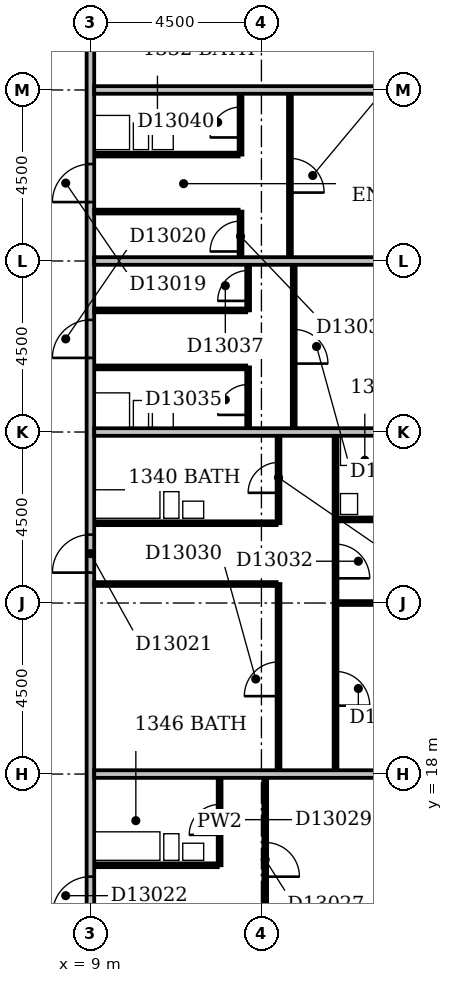
"""IFC4 building model, lengths in metres.
Left out: names, types, materials, properties, quantities, classifications, styles, units other than length and angle.
Written with IfcOpenShell. Run it as: python <this file> out.ifc"""

import sys

from ifc_helpers import new_model, si_unit, direction, frame, frame_2d, origin, place, context, subcontext, project, spatial, rectangle, extrude, element, fill, save


model = new_model("IFC4")
c1 = context("Model", 3, precision=1e-05, world=origin(), true_north=direction((0.0, 1.0)))
c2 = subcontext(c1, "Body", "Model", "MODEL_VIEW")
j1 = project(units=[si_unit("LENGTHUNIT", "METRE"), si_unit("PLANEANGLEUNIT", "RADIAN")], contexts=[c1])
p1 = place(None, origin())
s1 = spatial("IfcSite", under=j1, at=p1, CompositionType="ELEMENT")
p2 = place(p1, origin())
s2 = spatial("IfcBuilding", under=s1, at=p2, CompositionType="ELEMENT")
p3 = place(p2, frame((0.0, 0.0, 57.8)))
s3 = spatial("IfcBuildingStorey", under=s2, at=p3, CompositionType="ELEMENT", Elevation=57.8)
p4 = place(p3, frame((9.0, 5.0, 0.0), z_axis=(0.0, 0.0, 1.0), x_axis=(0.0, 1.0, 0.0)))
e1 = element("IfcWall", 1, at=p4, inside=s3, PredefinedType="PARTITIONING", context=c2, shape_type="SweptSolid", body=[
    extrude(rectangle(XDim=44.5, YDim=0.2, at=frame_2d((22.25, 0.0))), origin(), (0.0, 0.0, 1.0), 3.3),
])
p5 = place(p4, frame((28.05, 0.0, 0.0)))
e2 = element("IfcOpeningElement", 2, at=p5, cuts=e1, PredefinedType="OPENING", context=c2, shape_type="SweptSolid", body=[
    extrude(rectangle(XDim=1.0, YDim=2.1, at=frame_2d((0.5, 1.05))), frame((0.0, 0.112, 0.0), z_axis=(0.0, -1.0, 0.0), x_axis=(1.0, 0.0, 0.0)), (0.0, 0.0, 1.0), 0.224),
])
p6 = place(p4, frame((23.95, 0.0, 0.0)))
e3 = element("IfcOpeningElement", 3, at=p6, cuts=e1, PredefinedType="OPENING", context=c2, shape_type="SweptSolid", body=[
    extrude(rectangle(XDim=1.0, YDim=2.1, at=frame_2d((0.5, 1.05))), frame((0.0, 0.112, 0.0), z_axis=(0.0, -1.0, 0.0), x_axis=(1.0, 0.0, 0.0)), (0.0, 0.0, 1.0), 0.224),
])
p7 = place(p4, frame((18.3, 0.0, 0.0)))
e4 = element("IfcOpeningElement", 4, at=p7, cuts=e1, PredefinedType="OPENING", context=c2, shape_type="SweptSolid", body=[
    extrude(rectangle(XDim=1.0, YDim=2.1, at=frame_2d((0.5, 1.05))), frame((0.0, 0.112, 0.0), z_axis=(0.0, -1.0, 0.0), x_axis=(1.0, 0.0, 0.0)), (0.0, 0.0, 1.0), 0.224),
])
p8 = place(p4, frame((9.3, 0.0, 0.0)))
e5 = element("IfcOpeningElement", 5, at=p8, cuts=e1, PredefinedType="OPENING", context=c2, shape_type="SweptSolid", body=[
    extrude(rectangle(XDim=1.0, YDim=2.1, at=frame_2d((0.5, 1.05))), frame((0.0, 0.112, 0.0), z_axis=(0.0, -1.0, 0.0), x_axis=(1.0, 0.0, 0.0)), (0.0, 0.0, 1.0), 0.224),
])
p9 = place(p4, frame((32.75, 0.0, 0.0)))
e6 = element("IfcOpeningElement", 6, at=p9, cuts=e1, PredefinedType="OPENING", context=c2, shape_type="SweptSolid", body=[
    extrude(rectangle(XDim=0.9, YDim=2.1, at=frame_2d((0.45, 1.05))), frame((0.0, 0.112, 0.0), z_axis=(0.0, -1.0, 0.0), x_axis=(1.0, 0.0, 0.0)), (0.0, 0.0, 1.0), 0.224),
])
p10 = place(p4, frame((1.5, 0.0, 0.0)))
e7 = element("IfcOpeningElement", 7, at=p10, cuts=e1, PredefinedType="OPENING", context=c2, shape_type="SweptSolid", body=[
    extrude(rectangle(XDim=0.9, YDim=2.1, at=frame_2d((0.45, 1.05))), frame((0.0, 0.112, 0.0), z_axis=(0.0, -1.0, 0.0), x_axis=(1.0, 0.0, 0.0)), (0.0, 0.0, 1.0), 0.224),
])
p11 = place(p3, frame((13.6, 9.6, 0.0), z_axis=(0.0, 0.0, 1.0), x_axis=(0.0, 1.0, 0.0)))
e8 = element("IfcWall", 8, at=p11, inside=s3, PredefinedType="PARTITIONING", context=c2, shape_type="SweptSolid", body=[
    extrude(rectangle(XDim=8.3, YDim=0.1, at=frame_2d((4.15, 0.0))), origin(), (0.0, 0.0, 1.0), 3.3),
])
p12 = place(p11, frame((1.2, 0.0, 0.0)))
e9 = element("IfcOpeningElement", 9, at=p12, cuts=e8, PredefinedType="OPENING", context=c2, shape_type="SweptSolid", body=[
    extrude(rectangle(XDim=0.9, YDim=2.1, at=frame_2d((0.45, 1.05))), frame((0.0, 0.062, 0.0), z_axis=(0.0, -1.0, 0.0), x_axis=(1.0, 0.0, 0.0)), (0.0, 0.0, 1.0), 0.124),
])
p13 = place(p11, frame((5.7, 0.0, 0.0)))
e10 = element("IfcOpeningElement", 10, at=p13, cuts=e8, PredefinedType="OPENING", context=c2, shape_type="SweptSolid", body=[
    extrude(rectangle(XDim=0.9, YDim=2.1, at=frame_2d((0.45, 1.05))), frame((0.0, 0.062, 0.0), z_axis=(0.0, -1.0, 0.0), x_axis=(1.0, 0.0, 0.0)), (0.0, 0.0, 1.0), 0.124),
])
p14 = place(p3, frame((9.1, 15.6, 0.0), z_axis=(0.0, 0.0, 1.0), x_axis=(1.0, 0.0, 0.0)))
e11 = element("IfcWall", 11, at=p14, inside=s3, PredefinedType="PLUMBINGWALL", context=c2, shape_type="SweptSolid", body=[
    extrude(rectangle(XDim=3.25, YDim=0.1, at=frame_2d((1.625, 0.0))), origin(), (0.0, 0.0, 1.0), 3.3),
])
p15 = place(p3, frame((12.4, 15.6, 0.0), z_axis=(0.0, 0.0, 1.0), x_axis=(0.0, 1.0, 0.0)))
e12 = element("IfcWall", 12, at=p15, inside=s3, PredefinedType="PARTITIONING", context=c2, shape_type="SweptSolid", body=[
    extrude(rectangle(XDim=2.3, YDim=0.1, at=frame_2d((1.15, 0.0))), origin(), (0.0, 0.0, 1.0), 3.3),
])
p16 = place(p15, frame((0.8, 0.0, 0.0)))
e13 = element("IfcOpeningElement", 13, at=p16, cuts=e12, PredefinedType="OPENING", context=c2, shape_type="SweptSolid", body=[
    extrude(rectangle(XDim=0.8, YDim=2.1, at=frame_2d((0.4, 1.05))), frame((0.0, 0.062, 0.0), z_axis=(0.0, -1.0, 0.0), x_axis=(1.0, 0.0, 0.0)), (0.0, 0.0, 1.0), 0.124),
])
p17 = place(p3, frame((9.1, 18.0, 0.0), z_axis=(0.0, 0.0, 1.0), x_axis=(1.0, 0.0, 0.0)))
e14 = element("IfcWall", 14, at=p17, inside=s3, PredefinedType="PARTITIONING", context=c2, shape_type="SweptSolid", body=[
    extrude(rectangle(XDim=8.3, YDim=0.2, at=frame_2d((4.15, 0.0))), origin(), (0.0, 0.0, 1.0), 2.6),
])
p18 = place(p3, frame((13.95, 18.1, 0.0), z_axis=(0.0, 0.0, 1.0), x_axis=(0.0, 1.0, 0.0)))
e15 = element("IfcWall", 15, at=p18, inside=s3, PredefinedType="PARTITIONING", context=c2, shape_type="SweptSolid", body=[
    extrude(rectangle(XDim=4.9, YDim=0.1, at=frame_2d((2.45, 0.0))), origin(), (0.0, 0.0, 1.0), 3.3),
])
p19 = place(p18, frame((1.95, 0.0, 0.0)))
e16 = element("IfcOpeningElement", 16, at=p19, cuts=e15, PredefinedType="OPENING", context=c2, shape_type="SweptSolid", body=[
    extrude(rectangle(XDim=0.9, YDim=2.1, at=frame_2d((0.45, 1.05))), frame((0.0, 0.062, 0.0), z_axis=(0.0, -1.0, 0.0), x_axis=(1.0, 0.0, 0.0)), (0.0, 0.0, 1.0), 0.124),
])
p20 = place(p3, frame((15.45, 18.1, 0.0), z_axis=(0.0, 0.0, 1.0), x_axis=(0.0, 1.0, 0.0)))
e17 = element("IfcWall", 17, at=p20, inside=s3, PredefinedType="PARTITIONING", context=c2, shape_type="SweptSolid", body=[
    extrude(rectangle(XDim=8.8, YDim=0.1, at=frame_2d((4.4, 0.0))), origin(), (0.0, 0.0, 1.0), 3.3),
])
p21 = place(p20, frame((1.7, 0.0, 0.0)))
e18 = element("IfcOpeningElement", 18, at=p21, cuts=e17, PredefinedType="OPENING", context=c2, shape_type="SweptSolid", body=[
    extrude(rectangle(XDim=0.9, YDim=2.1, at=frame_2d((0.45, 1.05))), frame((0.0, 0.062, 0.0), z_axis=(0.0, -1.0, 0.0), x_axis=(1.0, 0.0, 0.0)), (0.0, 0.0, 1.0), 0.124),
])
p22 = place(p20, frame((5.05, 0.0, 0.0)))
e19 = element("IfcOpeningElement", 19, at=p22, cuts=e17, PredefinedType="OPENING", context=c2, shape_type="SweptSolid", body=[
    extrude(rectangle(XDim=0.9, YDim=2.1, at=frame_2d((0.45, 1.05))), frame((0.0, 0.062, 0.0), z_axis=(0.0, -1.0, 0.0), x_axis=(1.0, 0.0, 0.0)), (0.0, 0.0, 1.0), 0.124),
])
p23 = place(p3, frame((15.5, 22.5, 0.0), z_axis=(0.0, 0.0, 1.0), x_axis=(1.0, 0.0, 0.0)))
e20 = element("IfcWall", 20, at=p23, inside=s3, PredefinedType="PARTITIONING", context=c2, shape_type="SweptSolid", body=[
    extrude(rectangle(XDim=6.4, YDim=0.1, at=frame_2d((3.2, 0.0))), origin(), (0.0, 0.0, 1.0), 3.3),
])
p24 = place(p3, frame((9.1, 23.0, 0.0), z_axis=(0.0, 0.0, 1.0), x_axis=(1.0, 0.0, 0.0)))
e21 = element("IfcWall", 21, at=p24, inside=s3, PredefinedType="PARTITIONING", context=c2, shape_type="SweptSolid", body=[
    extrude(rectangle(XDim=4.8, YDim=0.1, at=frame_2d((2.4, 0.0))), origin(), (0.0, 0.0, 1.0), 3.3),
])
p25 = place(p3, frame((9.1, 24.6, 0.0), z_axis=(0.0, 0.0, 1.0), x_axis=(1.0, 0.0, 0.0)))
e22 = element("IfcWall", 22, at=p25, inside=s3, PredefinedType="PLUMBINGWALL", context=c2, shape_type="SweptSolid", body=[
    extrude(rectangle(XDim=4.8, YDim=0.1, at=frame_2d((2.4, 0.0))), origin(), (0.0, 0.0, 1.0), 3.3),
])
p26 = place(p3, frame((13.95, 24.6, 0.0), z_axis=(0.0, 0.0, 1.0), x_axis=(0.0, 1.0, 0.0)))
e23 = element("IfcWall", 23, at=p26, inside=s3, PredefinedType="PARTITIONING", context=c2, shape_type="SweptSolid", body=[
    extrude(rectangle(XDim=2.3, YDim=0.1, at=frame_2d((1.15, 0.0))), origin(), (0.0, 0.0, 1.0), 3.3),
])
p27 = place(p26, frame((0.8, 0.0, 0.0)))
e24 = element("IfcOpeningElement", 24, at=p27, cuts=e23, PredefinedType="OPENING", context=c2, shape_type="SweptSolid", body=[
    extrude(rectangle(XDim=0.8, YDim=2.1, at=frame_2d((0.4, 1.05))), frame((0.0, 0.062, 0.0), z_axis=(0.0, -1.0, 0.0), x_axis=(1.0, 0.0, 0.0)), (0.0, 0.0, 1.0), 0.124),
])
p28 = place(p3, frame((15.5, 24.7, 0.0), z_axis=(0.0, 0.0, 1.0), x_axis=(1.0, 0.0, 0.0)))
e25 = element("IfcWall", 25, at=p28, inside=s3, PredefinedType="PLUMBINGWALL", context=c2, shape_type="SweptSolid", body=[
    extrude(rectangle(XDim=2.8, YDim=0.1, at=frame_2d((1.4, 0.0))), origin(), (0.0, 0.0, 1.0), 3.3),
])
p29 = place(p28, frame((1.0, 0.0, 0.0)))
e26 = element("IfcOpeningElement", 26, at=p29, cuts=e25, PredefinedType="OPENING", context=c2, shape_type="SweptSolid", body=[
    extrude(rectangle(XDim=0.8, YDim=2.1, at=frame_2d((0.4, 1.05))), frame((0.0, 0.062, 0.0), z_axis=(0.0, -1.0, 0.0), x_axis=(1.0, 0.0, 0.0)), (0.0, 0.0, 1.0), 0.124),
])
p30 = place(p3, frame((9.1, 27.0, 0.0), z_axis=(0.0, 0.0, 1.0), x_axis=(1.0, 0.0, 0.0)))
e27 = element("IfcWall", 27, at=p30, inside=s3, PredefinedType="PARTITIONING", context=c2, shape_type="SweptSolid", body=[
    extrude(rectangle(XDim=12.8, YDim=0.2, at=frame_2d((6.4, 0.0))), origin(), (0.0, 0.0, 1.0), 2.7),
])
p31 = place(p3, frame((13.15, 27.1, 0.0), z_axis=(0.0, 0.0, 1.0), x_axis=(0.0, 1.0, 0.0)))
e28 = element("IfcWall", 28, at=p31, inside=s3, PredefinedType="PARTITIONING", context=c2, shape_type="SweptSolid", body=[
    extrude(rectangle(XDim=1.6, YDim=0.1, at=frame_2d((0.8, 0.0))), origin(), (0.0, 0.0, 1.0), 3.3),
])
p32 = place(p31, frame((0.35, 0.0, 0.0)))
e29 = element("IfcOpeningElement", 29, at=p32, cuts=e28, PredefinedType="OPENING", context=c2, shape_type="SweptSolid", body=[
    extrude(rectangle(XDim=0.8, YDim=2.1, at=frame_2d((0.4, 1.05))), frame((0.0, 0.062, 0.0), z_axis=(0.0, -1.0, 0.0), x_axis=(1.0, 0.0, 0.0)), (0.0, 0.0, 1.0), 0.124),
])
p33 = place(p3, frame((14.35, 27.1, 0.0), z_axis=(0.0, 0.0, 1.0), x_axis=(0.0, 1.0, 0.0)))
e30 = element("IfcWall", 30, at=p33, inside=s3, PredefinedType="PARTITIONING", context=c2, shape_type="SweptSolid", body=[
    extrude(rectangle(XDim=4.3, YDim=0.1, at=frame_2d((2.15, 0.0))), origin(), (0.0, 0.0, 1.0), 3.3),
])
p34 = place(p33, frame((1.7, 0.0, 0.0)))
e31 = element("IfcOpeningElement", 31, at=p34, cuts=e30, PredefinedType="OPENING", context=c2, shape_type="SweptSolid", body=[
    extrude(rectangle(XDim=0.9, YDim=2.1, at=frame_2d((0.45, 1.05))), frame((0.0, 0.062, 0.0), z_axis=(0.0, -1.0, 0.0), x_axis=(1.0, 0.0, 0.0)), (0.0, 0.0, 1.0), 0.124),
])
p35 = place(p3, frame((9.1, 28.7, 0.0), z_axis=(0.0, 0.0, 1.0), x_axis=(1.0, 0.0, 0.0)))
e32 = element("IfcWall", 32, at=p35, inside=s3, PredefinedType="PLUMBINGWALL", context=c2, shape_type="SweptSolid", body=[
    extrude(rectangle(XDim=4.0, YDim=0.1, at=frame_2d((2.0, 0.0))), origin(), (0.0, 0.0, 1.0), 3.3),
])
p36 = place(p3, frame((9.1, 30.2, 0.0), z_axis=(0.0, 0.0, 1.0), x_axis=(1.0, 0.0, 0.0)))
e33 = element("IfcWall", 33, at=p36, inside=s3, PredefinedType="PARTITIONING", context=c2, shape_type="SweptSolid", body=[
    extrude(rectangle(XDim=4.0, YDim=0.1, at=frame_2d((2.0, 0.0))), origin(), (0.0, 0.0, 1.0), 3.3),
])
p37 = place(p3, frame((13.15, 30.2, 0.0), z_axis=(0.0, 0.0, 1.0), x_axis=(0.0, 1.0, 0.0)))
e34 = element("IfcWall", 34, at=p37, inside=s3, PredefinedType="PARTITIONING", context=c2, shape_type="SweptSolid", body=[
    extrude(rectangle(XDim=1.2, YDim=0.1, at=frame_2d((0.6, 0.0))), origin(), (0.0, 0.0, 1.0), 3.3),
])
p38 = place(p37, frame((0.25, 0.0, 0.0)))
e35 = element("IfcOpeningElement", 35, at=p38, cuts=e34, PredefinedType="OPENING", context=c2, shape_type="SweptSolid", body=[
    extrude(rectangle(XDim=0.8, YDim=2.1, at=frame_2d((0.4, 1.05))), frame((0.0, 0.062, 0.0), z_axis=(0.0, -1.0, 0.0), x_axis=(1.0, 0.0, 0.0)), (0.0, 0.0, 1.0), 0.124),
])
p39 = place(p3, frame((9.1, 31.5, 0.0), z_axis=(0.0, 0.0, 1.0), x_axis=(1.0, 0.0, 0.0)))
e36 = element("IfcWall", 36, at=p39, inside=s3, PredefinedType="PARTITIONING", context=c2, shape_type="SweptSolid", body=[
    extrude(rectangle(XDim=12.8, YDim=0.2, at=frame_2d((6.4, 0.0))), origin(), (0.0, 0.0, 1.0), 3.3),
])
p40 = place(p3, frame((12.95, 31.6, 0.0), z_axis=(0.0, 0.0, 1.0), x_axis=(0.0, 1.0, 0.0)))
e37 = element("IfcWall", 37, at=p40, inside=s3, PredefinedType="PARTITIONING", context=c2, shape_type="SweptSolid", body=[
    extrude(rectangle(XDim=1.2, YDim=0.1, at=frame_2d((0.6, 0.0))), origin(), (0.0, 0.0, 1.0), 3.3),
])
p41 = place(p40, frame((0.15, 0.0, 0.0)))
e38 = element("IfcOpeningElement", 38, at=p41, cuts=e37, PredefinedType="OPENING", context=c2, shape_type="SweptSolid", body=[
    extrude(rectangle(XDim=0.8, YDim=2.1, at=frame_2d((0.4, 1.05))), frame((0.0, 0.062, 0.0), z_axis=(0.0, -1.0, 0.0), x_axis=(1.0, 0.0, 0.0)), (0.0, 0.0, 1.0), 0.124),
])
p42 = place(p3, frame((14.25, 31.6, 0.0), z_axis=(0.0, 0.0, 1.0), x_axis=(0.0, 1.0, 0.0)))
e39 = element("IfcWall", 39, at=p42, inside=s3, PredefinedType="PARTITIONING", context=c2, shape_type="SweptSolid", body=[
    extrude(rectangle(XDim=4.3, YDim=0.1, at=frame_2d((2.15, 0.0))), origin(), (0.0, 0.0, 1.0), 3.3),
])
p43 = place(p42, frame((1.7, 0.0, 0.0)))
e40 = element("IfcOpeningElement", 40, at=p43, cuts=e39, PredefinedType="OPENING", context=c2, shape_type="SweptSolid", body=[
    extrude(rectangle(XDim=0.9, YDim=2.1, at=frame_2d((0.45, 1.05))), frame((0.0, 0.062, 0.0), z_axis=(0.0, -1.0, 0.0), x_axis=(1.0, 0.0, 0.0)), (0.0, 0.0, 1.0), 0.124),
])
p44 = place(p3, frame((9.1, 32.8, 0.0), z_axis=(0.0, 0.0, 1.0), x_axis=(1.0, 0.0, 0.0)))
e41 = element("IfcWall", 41, at=p44, inside=s3, PredefinedType="PARTITIONING", context=c2, shape_type="SweptSolid", body=[
    extrude(rectangle(XDim=3.8, YDim=0.1, at=frame_2d((1.9, 0.0))), origin(), (0.0, 0.0, 1.0), 3.3),
])
p45 = place(p3, frame((9.1, 34.3, 0.0), z_axis=(0.0, 0.0, 1.0), x_axis=(1.0, 0.0, 0.0)))
e42 = element("IfcWall", 42, at=p45, inside=s3, PredefinedType="PLUMBINGWALL", context=c2, shape_type="SweptSolid", body=[
    extrude(rectangle(XDim=3.8, YDim=0.1, at=frame_2d((1.9, 0.0))), origin(), (0.0, 0.0, 1.0), 3.3),
])
p46 = place(p3, frame((12.95, 34.3, 0.0), z_axis=(0.0, 0.0, 1.0), x_axis=(0.0, 1.0, 0.0)))
e43 = element("IfcWall", 43, at=p46, inside=s3, PredefinedType="PARTITIONING", context=c2, shape_type="SweptSolid", body=[
    extrude(rectangle(XDim=1.6, YDim=0.1, at=frame_2d((0.8, 0.0))), origin(), (0.0, 0.0, 1.0), 3.3),
])
p47 = place(p46, frame((0.45, 0.0, 0.0)))
e44 = element("IfcOpeningElement", 44, at=p47, cuts=e43, PredefinedType="OPENING", context=c2, shape_type="SweptSolid", body=[
    extrude(rectangle(XDim=0.8, YDim=2.1, at=frame_2d((0.4, 1.05))), frame((0.0, 0.062, 0.0), z_axis=(0.0, -1.0, 0.0), x_axis=(1.0, 0.0, 0.0)), (0.0, 0.0, 1.0), 0.124),
])
p48 = place(p3, frame((9.1, 36.0, 0.0), z_axis=(0.0, 0.0, 1.0), x_axis=(1.0, 0.0, 0.0)))
e45 = element("IfcWall", 45, at=p48, inside=s3, PredefinedType="PARTITIONING", context=c2, shape_type="SweptSolid", body=[
    extrude(rectangle(XDim=12.8, YDim=0.2, at=frame_2d((6.4, 0.0))), origin(), (0.0, 0.0, 1.0), 2.4),
])
p49 = place(p5, origin())
e46 = element("IfcDoor", 46, at=p49, inside=s3, OperationType="SINGLE_SWING_LEFT", PredefinedType="DOOR", context=c2, shape_type="SweptSolid", body=[
    extrude(rectangle(XDim=1.0, YDim=2.1, at=frame_2d((0.5, 1.05))), frame((0.0, 0.025, 0.0), z_axis=(0.0, -1.0, 0.0), x_axis=(1.0, 0.0, 0.0)), (0.0, 0.0, 1.0), 0.05),
])
fill(e2, e46)
p50 = place(p6, origin())
e47 = element("IfcDoor", 47, at=p50, inside=s3, OperationType="SINGLE_SWING_LEFT", PredefinedType="DOOR", context=c2, shape_type="SweptSolid", body=[
    extrude(rectangle(XDim=1.0, YDim=2.1, at=frame_2d((0.5, 1.05))), frame((0.0, 0.025, 0.0), z_axis=(0.0, -1.0, 0.0), x_axis=(1.0, 0.0, 0.0)), (0.0, 0.0, 1.0), 0.05),
])
fill(e3, e47)
p51 = place(p7, origin())
e48 = element("IfcDoor", 48, at=p51, inside=s3, OperationType="SINGLE_SWING_LEFT", PredefinedType="DOOR", context=c2, shape_type="SweptSolid", body=[
    extrude(rectangle(XDim=1.0, YDim=2.1, at=frame_2d((0.5, 1.05))), frame((0.0, 0.025, 0.0), z_axis=(0.0, -1.0, 0.0), x_axis=(1.0, 0.0, 0.0)), (0.0, 0.0, 1.0), 0.05),
])
fill(e4, e48)
p52 = place(p8, origin())
e49 = element("IfcDoor", 49, at=p52, inside=s3, OperationType="SINGLE_SWING_LEFT", PredefinedType="DOOR", context=c2, shape_type="SweptSolid", body=[
    extrude(rectangle(XDim=1.0, YDim=2.1, at=frame_2d((0.5, 1.05))), frame((0.0, 0.025, 0.0), z_axis=(0.0, -1.0, 0.0), x_axis=(1.0, 0.0, 0.0)), (0.0, 0.0, 1.0), 0.05),
])
fill(e5, e49)
p53 = place(p13, frame((0.9, 0.0, 0.0), z_axis=(0.0, 0.0, 1.0), x_axis=(-1.0, 0.0, 0.0)))
e50 = element("IfcDoor", 50, at=p53, inside=s3, OperationType="SINGLE_SWING_RIGHT", PredefinedType="DOOR", context=c2, shape_type="SweptSolid", body=[
    extrude(rectangle(XDim=0.9, YDim=2.1, at=frame_2d((0.45, 1.05))), frame((0.0, 0.025, 0.0), z_axis=(0.0, -1.0, 0.0), x_axis=(1.0, 0.0, 0.0)), (0.0, 0.0, 1.0), 0.05),
])
fill(e10, e50)
p54 = place(p16, origin())
e51 = element("IfcDoor", 51, at=p54, inside=s3, OperationType="SINGLE_SWING_LEFT", PredefinedType="DOOR", context=c2, shape_type="SweptSolid", body=[
    extrude(rectangle(XDim=0.8, YDim=2.1, at=frame_2d((0.4, 1.05))), frame((0.0, 0.025, 0.0), z_axis=(0.0, -1.0, 0.0), x_axis=(1.0, 0.0, 0.0)), (0.0, 0.0, 1.0), 0.05),
])
fill(e13, e51)
p55 = place(p19, origin())
e52 = element("IfcDoor", 52, at=p55, inside=s3, OperationType="SINGLE_SWING_LEFT", PredefinedType="DOOR", context=c2, shape_type="SweptSolid", body=[
    extrude(rectangle(XDim=0.9, YDim=2.1, at=frame_2d((0.45, 1.05))), frame((0.0, 0.025, 0.0), z_axis=(0.0, -1.0, 0.0), x_axis=(1.0, 0.0, 0.0)), (0.0, 0.0, 1.0), 0.05),
])
fill(e16, e52)
p56 = place(p21, frame((0.9, 0.0, 0.0), z_axis=(0.0, 0.0, 1.0), x_axis=(-1.0, 0.0, 0.0)))
e53 = element("IfcDoor", 53, at=p56, inside=s3, OperationType="SINGLE_SWING_RIGHT", PredefinedType="DOOR", context=c2, shape_type="SweptSolid", body=[
    extrude(rectangle(XDim=0.9, YDim=2.1, at=frame_2d((0.45, 1.05))), frame((0.0, 0.025, 0.0), z_axis=(0.0, -1.0, 0.0), x_axis=(1.0, 0.0, 0.0)), (0.0, 0.0, 1.0), 0.05),
])
fill(e18, e53)
p57 = place(p22, frame((0.9, 0.0, 0.0), z_axis=(0.0, 0.0, 1.0), x_axis=(-1.0, 0.0, 0.0)))
e54 = element("IfcDoor", 54, at=p57, inside=s3, OperationType="SINGLE_SWING_RIGHT", PredefinedType="DOOR", context=c2, shape_type="SweptSolid", body=[
    extrude(rectangle(XDim=0.9, YDim=2.1, at=frame_2d((0.45, 1.05))), frame((0.0, 0.025, 0.0), z_axis=(0.0, -1.0, 0.0), x_axis=(1.0, 0.0, 0.0)), (0.0, 0.0, 1.0), 0.05),
])
fill(e19, e54)
p58 = place(p27, origin())
e55 = element("IfcDoor", 55, at=p58, inside=s3, OperationType="SINGLE_SWING_LEFT", PredefinedType="DOOR", context=c2, shape_type="SweptSolid", body=[
    extrude(rectangle(XDim=0.8, YDim=2.1, at=frame_2d((0.4, 1.05))), frame((0.0, 0.025, 0.0), z_axis=(0.0, -1.0, 0.0), x_axis=(1.0, 0.0, 0.0)), (0.0, 0.0, 1.0), 0.05),
])
fill(e24, e55)
p59 = place(p32, origin())
e56 = element("IfcDoor", 56, at=p59, inside=s3, OperationType="SINGLE_SWING_LEFT", PredefinedType="DOOR", context=c2, shape_type="SweptSolid", body=[
    extrude(rectangle(XDim=0.8, YDim=2.1, at=frame_2d((0.4, 1.05))), frame((0.0, 0.025, 0.0), z_axis=(0.0, -1.0, 0.0), x_axis=(1.0, 0.0, 0.0)), (0.0, 0.0, 1.0), 0.05),
])
fill(e29, e56)
p60 = place(p34, frame((0.9, 0.0, 0.0), z_axis=(0.0, 0.0, 1.0), x_axis=(-1.0, 0.0, 0.0)))
e57 = element("IfcDoor", 57, at=p60, inside=s3, OperationType="SINGLE_SWING_RIGHT", PredefinedType="DOOR", context=c2, shape_type="SweptSolid", body=[
    extrude(rectangle(XDim=0.9, YDim=2.1, at=frame_2d((0.45, 1.05))), frame((0.0, 0.025, 0.0), z_axis=(0.0, -1.0, 0.0), x_axis=(1.0, 0.0, 0.0)), (0.0, 0.0, 1.0), 0.05),
])
fill(e31, e57)
p61 = place(p38, origin())
e58 = element("IfcDoor", 58, at=p61, inside=s3, OperationType="SINGLE_SWING_LEFT", PredefinedType="DOOR", context=c2, shape_type="SweptSolid", body=[
    extrude(rectangle(XDim=0.8, YDim=2.1, at=frame_2d((0.4, 1.05))), frame((0.0, 0.025, 0.0), z_axis=(0.0, -1.0, 0.0), x_axis=(1.0, 0.0, 0.0)), (0.0, 0.0, 1.0), 0.05),
])
fill(e35, e58)
p62 = place(p41, origin())
e59 = element("IfcDoor", 59, at=p62, inside=s3, OperationType="SINGLE_SWING_LEFT", PredefinedType="DOOR", context=c2, shape_type="SweptSolid", body=[
    extrude(rectangle(XDim=0.8, YDim=2.1, at=frame_2d((0.4, 1.05))), frame((0.0, 0.025, 0.0), z_axis=(0.0, -1.0, 0.0), x_axis=(1.0, 0.0, 0.0)), (0.0, 0.0, 1.0), 0.05),
])
fill(e38, e59)
p63 = place(p43, frame((0.9, 0.0, 0.0), z_axis=(0.0, 0.0, 1.0), x_axis=(-1.0, 0.0, 0.0)))
e60 = element("IfcDoor", 60, at=p63, inside=s3, OperationType="SINGLE_SWING_RIGHT", PredefinedType="DOOR", context=c2, shape_type="SweptSolid", body=[
    extrude(rectangle(XDim=0.9, YDim=2.1, at=frame_2d((0.45, 1.05))), frame((0.0, 0.025, 0.0), z_axis=(0.0, -1.0, 0.0), x_axis=(1.0, 0.0, 0.0)), (0.0, 0.0, 1.0), 0.05),
])
fill(e40, e60)
p64 = place(p47, origin())
e61 = element("IfcDoor", 61, at=p64, inside=s3, OperationType="SINGLE_SWING_LEFT", PredefinedType="DOOR", context=c2, shape_type="SweptSolid", body=[
    extrude(rectangle(XDim=0.8, YDim=2.1, at=frame_2d((0.4, 1.05))), frame((0.0, 0.025, 0.0), z_axis=(0.0, -1.0, 0.0), x_axis=(1.0, 0.0, 0.0)), (0.0, 0.0, 1.0), 0.05),
])
fill(e44, e61)
save(model, sys.argv[1])
